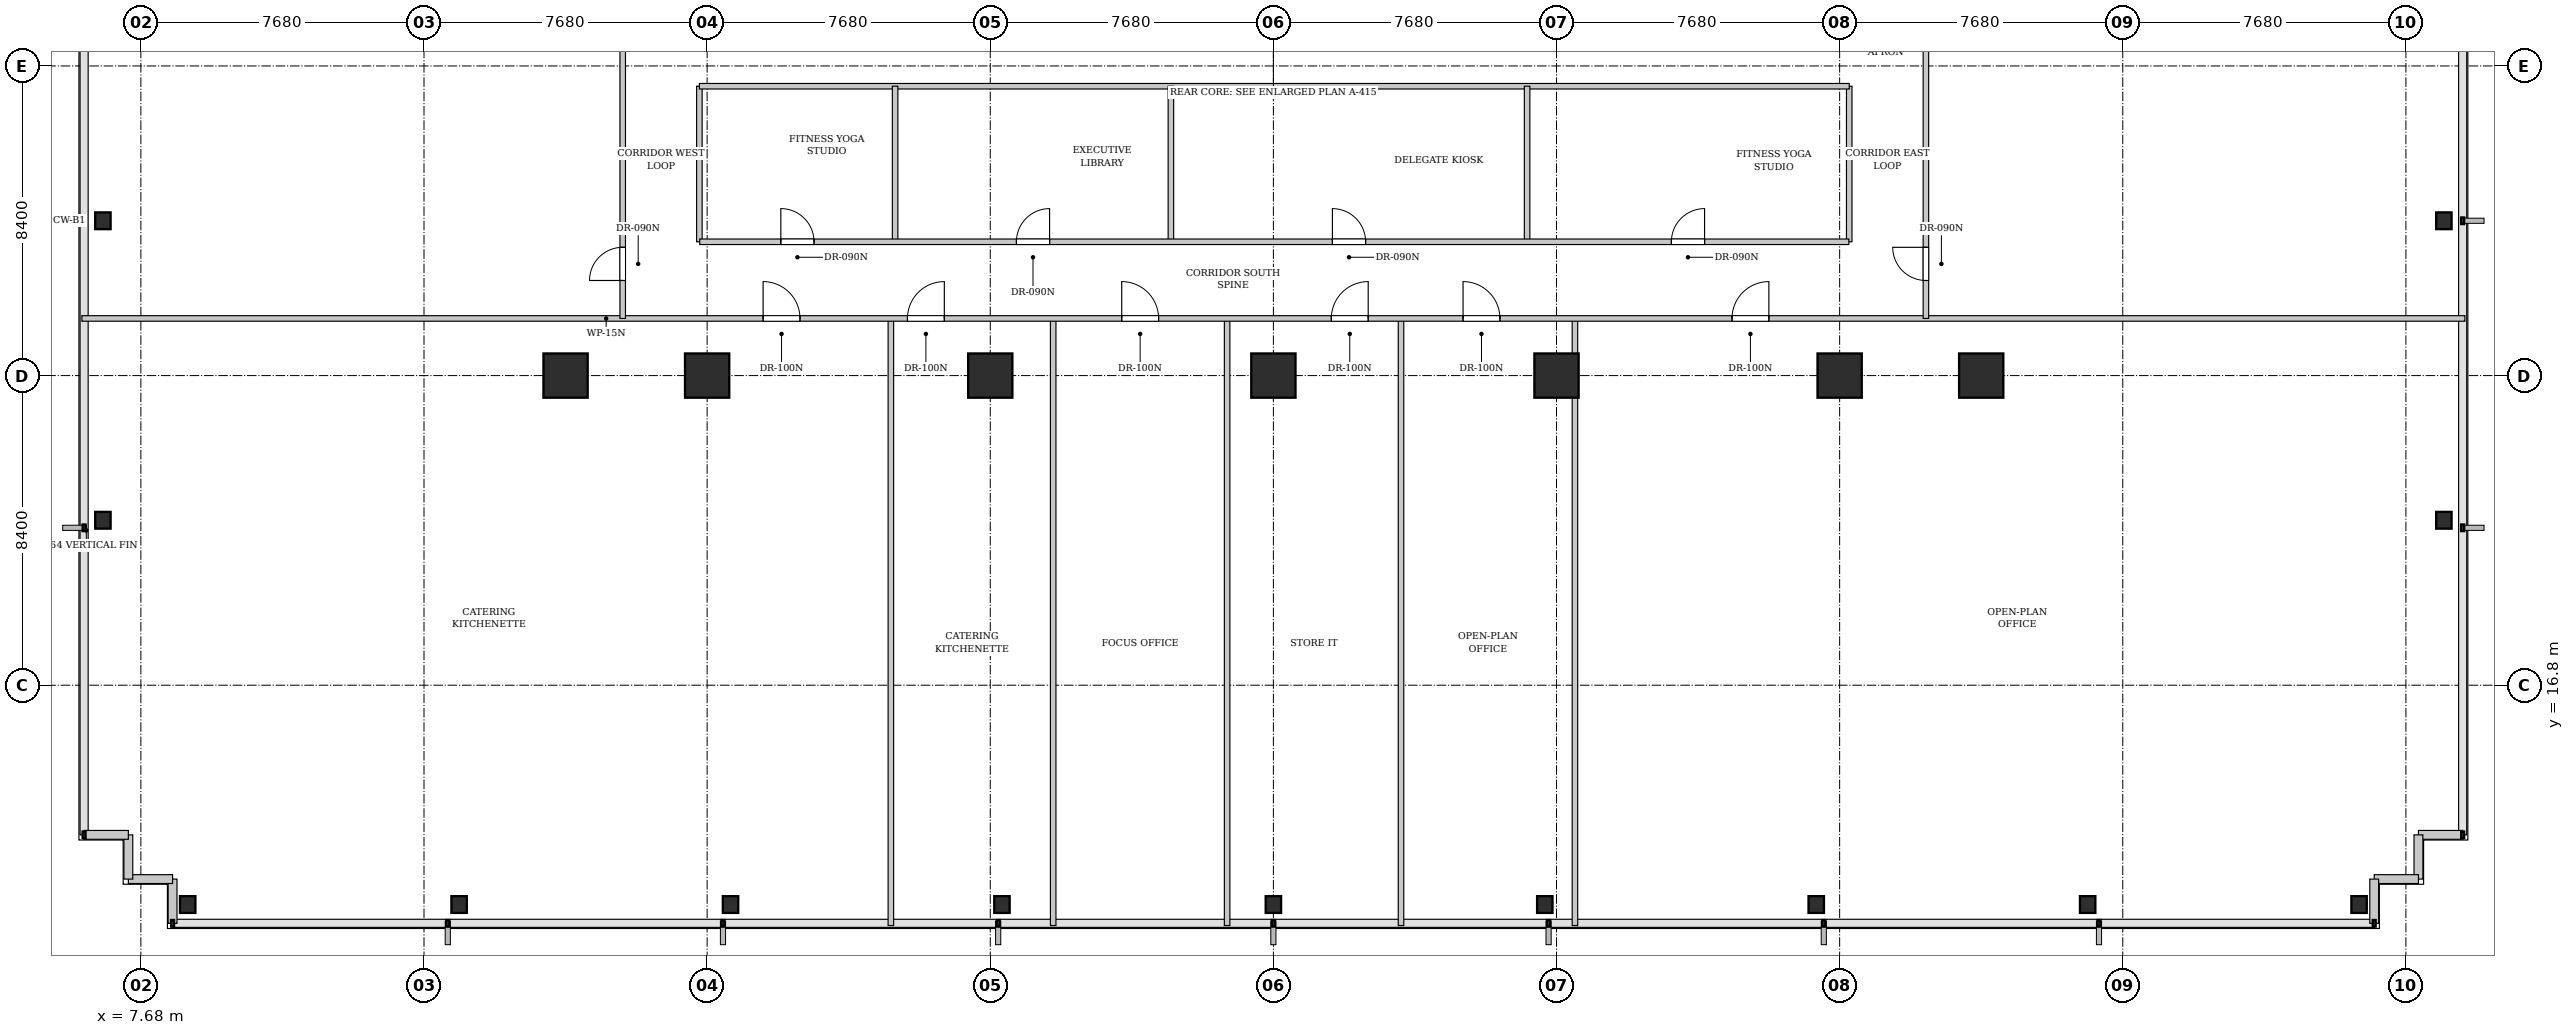
"""IFC4 building model, lengths in metres.
Left out: names, types, materials, properties, quantities, classifications, styles, units other than length and angle.
Written with IfcOpenShell. Run it as: python <this file> out.ifc"""

import sys

from ifc_helpers import new_model, si_unit, direction, frame, frame_2d, origin, origin_2d, place, context, subcontext, project, spatial, rectangle, i_section, extrude, element, fill, save


model = new_model("IFC4")
c1 = context("Model", 3, precision=1e-05, world=origin(), true_north=direction((0.0, 1.0)))
c2 = subcontext(c1, "Body", "Model", "MODEL_VIEW")
j1 = project(units=[si_unit("LENGTHUNIT", "METRE"), si_unit("PLANEANGLEUNIT", "RADIAN")], contexts=[c1])
p1 = place(None, origin())
s1 = spatial("IfcSite", under=j1, at=p1, CompositionType="ELEMENT")
p2 = place(p1, origin())
s2 = spatial("IfcBuilding", under=s1, at=p2, CompositionType="ELEMENT")
p3 = place(p2, frame((0.0, 0.0, 54.2)))
s3 = spatial("IfcBuildingStorey", under=s2, at=p3, CompositionType="ELEMENT", Elevation=54.2)
for number, where, z_axis, x_axis in (
    (1, (23.04, 25.2, 0.0), (0.0, 0.0, 1.0), (1.0, 0.0, 0.0)),
    (2, (30.72, 25.2, 0.0), (0.0, 0.0, 1.0), (1.0, 0.0, 0.0)),
    (3, (38.4, 25.2, 0.0), (0.0, 0.0, 1.0), (1.0, 0.0, 0.0)),
    (4, (46.08, 25.2, 0.0), (0.0, 0.0, 1.0), (1.0, 0.0, 0.0)),
    (5, (53.76, 25.2, 0.0), (0.0, 0.0, 1.0), (1.0, 0.0, 0.0)),
    (6, (19.2, 25.2, 0.0), (0.0, 0.0, 1.0), (1.0, 0.0, 0.0)),
    (7, (57.6, 25.2, 0.0), (0.0, 0.0, 1.0), (1.0, 0.0, 0.0)),
):
    element("IfcColumn", number, at=place(p3, frame(where, z_axis=z_axis, x_axis=x_axis)), inside=s3, PredefinedType="COLUMN", context=c2, shape_type="SweptSolid", body=[
        extrude(rectangle(XDim=1.2, YDim=1.2, at=origin_2d()), origin(), (0.0, 0.0, 1.0), 3.4),
    ])
for number, where, z_axis, x_axis in (
    (8, (8.95, 10.85, 0.0), (0.0, 0.0, 1.0), (1.0, 0.0, 0.0)),
    (9, (16.312, 10.85, 0.0), (0.0, 0.0, 1.0), (1.0, 0.0, 0.0)),
    (10, (23.675, 10.85, 0.0), (0.0, 0.0, 1.0), (1.0, 0.0, 0.0)),
    (11, (31.038, 10.85, 0.0), (0.0, 0.0, 1.0), (1.0, 0.0, 0.0)),
    (12, (38.4, 10.85, 0.0), (0.0, 0.0, 1.0), (1.0, 0.0, 0.0)),
    (13, (45.762, 10.85, 0.0), (0.0, 0.0, 1.0), (1.0, 0.0, 0.0)),
    (14, (53.125, 10.85, 0.0), (0.0, 0.0, 1.0), (1.0, 0.0, 0.0)),
    (15, (60.488, 10.85, 0.0), (0.0, 0.0, 1.0), (1.0, 0.0, 0.0)),
    (16, (67.85, 10.85, 0.0), (0.0, 0.0, 1.0), (1.0, 0.0, 0.0)),
    (17, (6.65, 21.275, 0.0), (0.0, 0.0, 1.0), (1.0, 0.0, 0.0)),
    (18, (70.15, 21.275, 0.0), (0.0, 0.0, 1.0), (1.0, 0.0, 0.0)),
    (19, (6.65, 29.4, 0.0), (0.0, 0.0, 1.0), (1.0, 0.0, 0.0)),
    (20, (70.15, 29.4, 0.0), (0.0, 0.0, 1.0), (1.0, 0.0, 0.0)),
):
    element("IfcColumn", number, at=place(p3, frame(where, z_axis=z_axis, x_axis=x_axis)), inside=s3, PredefinedType="COLUMN", context=c2, shape_type="SweptSolid", body=[
        extrude(i_section(OverallWidth=0.418, OverallDepth=0.455, WebThickness=0.042, FlangeThickness=0.068, FilletRadius=0.015, at=origin_2d()), origin(), (0.0, 0.0, 1.0), 3.4),
    ])
for number, where, z_axis, x_axis in (
    (21, (8.54, 10.34, 0.0), (0.0, 0.0, 1.0), (0.0, 1.0, 0.0)),
    (22, (8.54, 11.54, 0.0), (0.0, 0.0, 1.0), (-1.0, 0.0, 0.0)),
    (23, (7.34, 11.54, 0.0), (0.0, 0.0, 1.0), (0.0, 1.0, 0.0)),
):
    element("IfcWall", number, at=place(p3, frame(where, z_axis=z_axis, x_axis=x_axis)), inside=s3, PredefinedType="SOLIDWALL", context=c2, shape_type="SweptSolid", body=[
        extrude(rectangle(XDim=1.2, YDim=0.24, at=frame_2d((0.6, 0.0))), origin(), (0.0, 0.0, 1.0), 3.18),
    ])
p4 = place(p3, frame((7.34, 12.74, 0.0), z_axis=(0.0, 0.0, 1.0), x_axis=(-1.0, 0.0, 0.0)))
e24 = element("IfcWall", 24, at=p4, inside=s3, PredefinedType="SOLIDWALL", context=c2, shape_type="SweptSolid", body=[
    extrude(rectangle(XDim=1.2, YDim=0.24, at=frame_2d((0.6, 0.0))), origin(), (0.0, 0.0, 1.0), 3.18),
])
for number, where, z_axis, x_axis in (
    (25, (70.66, 12.74, 0.0), (0.0, 0.0, 1.0), (-1.0, 0.0, 0.0)),
    (26, (69.46, 12.74, 0.0), (0.0, 0.0, 1.0), (0.0, -1.0, 0.0)),
    (27, (69.46, 11.54, 0.0), (0.0, 0.0, 1.0), (-1.0, 0.0, 0.0)),
    (28, (68.26, 11.54, 0.0), (0.0, 0.0, 1.0), (0.0, -1.0, 0.0)),
):
    element("IfcWall", number, at=place(p3, frame(where, z_axis=z_axis, x_axis=x_axis)), inside=s3, PredefinedType="SOLIDWALL", context=c2, shape_type="SweptSolid", body=[
        extrude(rectangle(XDim=1.2, YDim=0.24, at=frame_2d((0.6, 0.0))), origin(), (0.0, 0.0, 1.0), 3.18),
    ])
for number, where, z_axis, x_axis in (
    (29, (28.024, 10.28, 0.0), (0.0, 0.0, 1.0), (0.0, 1.0, 0.0)),
    (30, (32.427, 10.28, 0.0), (0.0, 0.0, 1.0), (0.0, 1.0, 0.0)),
    (31, (37.145, 10.28, 0.0), (0.0, 0.0, 1.0), (0.0, 1.0, 0.0)),
    (32, (41.862, 10.28, 0.0), (0.0, 0.0, 1.0), (0.0, 1.0, 0.0)),
    (33, (46.58, 10.28, 0.0), (0.0, 0.0, 1.0), (0.0, 1.0, 0.0)),
):
    element("IfcWall", number, at=place(p3, frame(where, z_axis=z_axis, x_axis=x_axis)), inside=s3, PredefinedType="PARTITIONING", context=c2, shape_type="SweptSolid", body=[
        extrude(rectangle(XDim=16.49, YDim=0.15, at=frame_2d((8.245, 0.0))), origin(), (0.0, 0.0, 1.0), 3.18),
    ])
p5 = place(p3, frame((6.08, 26.75, 0.0), z_axis=(0.0, 0.0, 1.0), x_axis=(1.0, 0.0, 0.0)))
e34 = element("IfcWall", 34, at=p5, inside=s3, PredefinedType="PARTITIONING", context=c2, shape_type="SweptSolid", body=[
    extrude(rectangle(XDim=64.64, YDim=0.15, at=frame_2d((32.32, 0.0))), origin(), (0.0, 0.0, 1.0), 3.18),
])
p6 = place(p5, frame((18.479, 0.0, 0.0)))
e35 = element("IfcOpeningElement", 35, at=p6, cuts=e34, PredefinedType="OPENING", context=c2, shape_type="SweptSolid", body=[
    extrude(rectangle(XDim=1.0, YDim=2.15, at=frame_2d((0.5, 1.075))), frame((0.0, 0.085, 0.0), z_axis=(0.0, -1.0, 0.0), x_axis=(1.0, 0.0, 0.0)), (0.0, 0.0, 1.0), 0.17),
])
p7 = place(p5, frame((22.394, 0.0, 0.0)))
e36 = element("IfcOpeningElement", 36, at=p7, cuts=e34, PredefinedType="OPENING", context=c2, shape_type="SweptSolid", body=[
    extrude(rectangle(XDim=1.0, YDim=2.15, at=frame_2d((0.5, 1.075))), frame((0.0, 0.085, 0.0), z_axis=(0.0, -1.0, 0.0), x_axis=(1.0, 0.0, 0.0)), (0.0, 0.0, 1.0), 0.17),
])
p8 = place(p5, frame((28.206, 0.0, 0.0)))
e37 = element("IfcOpeningElement", 37, at=p8, cuts=e34, PredefinedType="OPENING", context=c2, shape_type="SweptSolid", body=[
    extrude(rectangle(XDim=1.0, YDim=2.15, at=frame_2d((0.5, 1.075))), frame((0.0, 0.085, 0.0), z_axis=(0.0, -1.0, 0.0), x_axis=(1.0, 0.0, 0.0)), (0.0, 0.0, 1.0), 0.17),
])
p9 = place(p5, frame((33.892, 0.0, 0.0)))
e38 = element("IfcOpeningElement", 38, at=p9, cuts=e34, PredefinedType="OPENING", context=c2, shape_type="SweptSolid", body=[
    extrude(rectangle(XDim=1.0, YDim=2.15, at=frame_2d((0.5, 1.075))), frame((0.0, 0.085, 0.0), z_axis=(0.0, -1.0, 0.0), x_axis=(1.0, 0.0, 0.0)), (0.0, 0.0, 1.0), 0.17),
])
p10 = place(p5, frame((37.465, 0.0, 0.0)))
e39 = element("IfcOpeningElement", 39, at=p10, cuts=e34, PredefinedType="OPENING", context=c2, shape_type="SweptSolid", body=[
    extrude(rectangle(XDim=1.0, YDim=2.15, at=frame_2d((0.5, 1.075))), frame((0.0, 0.085, 0.0), z_axis=(0.0, -1.0, 0.0), x_axis=(1.0, 0.0, 0.0)), (0.0, 0.0, 1.0), 0.17),
])
p11 = place(p5, frame((44.76, 0.0, 0.0)))
e40 = element("IfcOpeningElement", 40, at=p11, cuts=e34, PredefinedType="OPENING", context=c2, shape_type="SweptSolid", body=[
    extrude(rectangle(XDim=1.0, YDim=2.15, at=frame_2d((0.5, 1.075))), frame((0.0, 0.085, 0.0), z_axis=(0.0, -1.0, 0.0), x_axis=(1.0, 0.0, 0.0)), (0.0, 0.0, 1.0), 0.17),
])
p12 = place(p3, frame((20.75, 26.75, 0.0), z_axis=(0.0, 0.0, 1.0), x_axis=(0.0, 1.0, 0.0)))
e41 = element("IfcWall", 41, at=p12, inside=s3, PredefinedType="PARTITIONING", context=c2, shape_type="SweptSolid", body=[
    extrude(rectangle(XDim=21.77, YDim=0.15, at=frame_2d((10.885, 0.0))), origin(), (0.0, 0.0, 1.0), 3.18),
])
p13 = place(p12, frame((1.03, 0.0, 0.0)))
e42 = element("IfcOpeningElement", 42, at=p13, cuts=e41, PredefinedType="OPENING", context=c2, shape_type="SweptSolid", body=[
    extrude(rectangle(XDim=0.9, YDim=2.15, at=frame_2d((0.45, 1.075))), frame((0.0, 0.085, 0.0), z_axis=(0.0, -1.0, 0.0), x_axis=(1.0, 0.0, 0.0)), (0.0, 0.0, 1.0), 0.17),
])
p14 = place(p3, frame((56.1, 26.75, 0.0), z_axis=(0.0, 0.0, 1.0), x_axis=(0.0, 1.0, 0.0)))
e43 = element("IfcWall", 43, at=p14, inside=s3, PredefinedType="PARTITIONING", context=c2, shape_type="SweptSolid", body=[
    extrude(rectangle(XDim=21.77, YDim=0.15, at=frame_2d((10.885, 0.0))), origin(), (0.0, 0.0, 1.0), 3.18),
])
p15 = place(p14, frame((1.03, 0.0, 0.0)))
e44 = element("IfcOpeningElement", 44, at=p15, cuts=e43, PredefinedType="OPENING", context=c2, shape_type="SweptSolid", body=[
    extrude(rectangle(XDim=0.9, YDim=2.15, at=frame_2d((0.45, 1.075))), frame((0.0, 0.085, 0.0), z_axis=(0.0, -1.0, 0.0), x_axis=(1.0, 0.0, 0.0)), (0.0, 0.0, 1.0), 0.17),
])
p16 = place(p3, frame((22.83, 28.83, 0.0), z_axis=(0.0, 0.0, 1.0), x_axis=(0.0, 1.0, 0.0)))
e45 = element("IfcWall", 45, at=p16, inside=s3, PredefinedType="PARTITIONING", context=c2, shape_type="SweptSolid", body=[
    extrude(rectangle(XDim=4.22, YDim=0.15, at=frame_2d((2.11, 0.0))), origin(), (0.0, 0.0, 1.0), 2.475),
])
p17 = place(p3, frame((54.02, 28.83, 0.0), z_axis=(0.0, 0.0, 1.0), x_axis=(0.0, 1.0, 0.0)))
e46 = element("IfcWall", 46, at=p17, inside=s3, PredefinedType="PARTITIONING", context=c2, shape_type="SweptSolid", body=[
    extrude(rectangle(XDim=4.22, YDim=0.15, at=frame_2d((2.11, 0.0))), origin(), (0.0, 0.0, 1.0), 3.18),
])
p18 = place(p3, frame((22.83, 33.05, 0.0), z_axis=(0.0, 0.0, 1.0), x_axis=(1.0, 0.0, 0.0)))
e47 = element("IfcWall", 47, at=p18, inside=s3, PredefinedType="PARTITIONING", context=c2, shape_type="SweptSolid", body=[
    extrude(rectangle(XDim=31.19, YDim=0.15, at=frame_2d((15.595, 0.0))), origin(), (0.0, 0.0, 1.0), 3.18),
])
for number, where, z_axis, x_axis in (
    (48, (28.139, 28.83, 0.0), (0.0, 0.0, 1.0), (0.0, 1.0, 0.0)),
    (49, (35.62, 28.83, 0.0), (0.0, 0.0, 1.0), (0.0, 1.0, 0.0)),
    (50, (45.282, 28.83, 0.0), (0.0, 0.0, 1.0), (0.0, 1.0, 0.0)),
):
    element("IfcWall", number, at=place(p3, frame(where, z_axis=z_axis, x_axis=x_axis)), inside=s3, PredefinedType="PARTITIONING", context=c2, shape_type="SweptSolid", body=[
        extrude(rectangle(XDim=4.22, YDim=0.15, at=frame_2d((2.11, 0.0))), origin(), (0.0, 0.0, 1.0), 3.18),
    ])
p19 = place(p3, frame((22.84, 28.83, 0.0), z_axis=(0.0, 0.0, 1.0), x_axis=(1.0, 0.0, 0.0)))
e51 = element("IfcWall", 51, at=p19, inside=s3, PredefinedType="PARTITIONING", context=c2, shape_type="SweptSolid", body=[
    extrude(rectangle(XDim=31.17, YDim=0.15, at=frame_2d((15.585, 0.0))), origin(), (0.0, 0.0, 1.0), 3.18),
])
p20 = place(p19, frame((2.199, 0.0, 0.0)))
e52 = element("IfcOpeningElement", 52, at=p20, cuts=e51, PredefinedType="OPENING", context=c2, shape_type="SweptSolid", body=[
    extrude(rectangle(XDim=0.9, YDim=2.15, at=frame_2d((0.45, 1.075))), frame((0.0, 0.085, 0.0), z_axis=(0.0, -1.0, 0.0), x_axis=(1.0, 0.0, 0.0)), (0.0, 0.0, 1.0), 0.17),
])
p21 = place(p19, frame((8.59, 0.0, 0.0)))
e53 = element("IfcOpeningElement", 53, at=p21, cuts=e51, PredefinedType="OPENING", context=c2, shape_type="SweptSolid", body=[
    extrude(rectangle(XDim=0.9, YDim=2.15, at=frame_2d((0.45, 1.075))), frame((0.0, 0.085, 0.0), z_axis=(0.0, -1.0, 0.0), x_axis=(1.0, 0.0, 0.0)), (0.0, 0.0, 1.0), 0.17),
])
p22 = place(p19, frame((17.161, 0.0, 0.0)))
e54 = element("IfcOpeningElement", 54, at=p22, cuts=e51, PredefinedType="OPENING", context=c2, shape_type="SweptSolid", body=[
    extrude(rectangle(XDim=0.9, YDim=2.15, at=frame_2d((0.45, 1.075))), frame((0.0, 0.085, 0.0), z_axis=(0.0, -1.0, 0.0), x_axis=(1.0, 0.0, 0.0)), (0.0, 0.0, 1.0), 0.17),
])
p23 = place(p19, frame((26.356, 0.0, 0.0)))
e55 = element("IfcOpeningElement", 55, at=p23, cuts=e51, PredefinedType="OPENING", context=c2, shape_type="SweptSolid", body=[
    extrude(rectangle(XDim=0.9, YDim=2.15, at=frame_2d((0.45, 1.075))), frame((0.0, 0.085, 0.0), z_axis=(0.0, -1.0, 0.0), x_axis=(1.0, 0.0, 0.0)), (0.0, 0.0, 1.0), 0.17),
])
p24 = place(p6, origin())
e56 = element("IfcDoor", 56, at=p24, inside=s3, OperationType="SINGLE_SWING_LEFT", PredefinedType="DOOR", context=c2, shape_type="SweptSolid", body=[
    extrude(rectangle(XDim=1.0, YDim=2.15, at=frame_2d((0.5, 1.075))), frame((0.0, 0.025, 0.0), z_axis=(0.0, -1.0, 0.0), x_axis=(1.0, 0.0, 0.0)), (0.0, 0.0, 1.0), 0.05),
])
fill(e35, e56)
p25 = place(p7, origin())
e57 = element("IfcDoor", 57, at=p25, inside=s3, OperationType="SINGLE_SWING_RIGHT", PredefinedType="DOOR", context=c2, shape_type="SweptSolid", body=[
    extrude(rectangle(XDim=1.0, YDim=2.15, at=frame_2d((0.5, 1.075))), frame((0.0, 0.025, 0.0), z_axis=(0.0, -1.0, 0.0), x_axis=(1.0, 0.0, 0.0)), (0.0, 0.0, 1.0), 0.05),
])
fill(e36, e57)
p26 = place(p8, origin())
e58 = element("IfcDoor", 58, at=p26, inside=s3, OperationType="SINGLE_SWING_LEFT", PredefinedType="DOOR", context=c2, shape_type="SweptSolid", body=[
    extrude(rectangle(XDim=1.0, YDim=2.15, at=frame_2d((0.5, 1.075))), frame((0.0, 0.025, 0.0), z_axis=(0.0, -1.0, 0.0), x_axis=(1.0, 0.0, 0.0)), (0.0, 0.0, 1.0), 0.05),
])
fill(e37, e58)
p27 = place(p9, origin())
e59 = element("IfcDoor", 59, at=p27, inside=s3, OperationType="SINGLE_SWING_RIGHT", PredefinedType="DOOR", context=c2, shape_type="SweptSolid", body=[
    extrude(rectangle(XDim=1.0, YDim=2.15, at=frame_2d((0.5, 1.075))), frame((0.0, 0.025, 0.0), z_axis=(0.0, -1.0, 0.0), x_axis=(1.0, 0.0, 0.0)), (0.0, 0.0, 1.0), 0.05),
])
fill(e38, e59)
p28 = place(p10, origin())
e60 = element("IfcDoor", 60, at=p28, inside=s3, OperationType="SINGLE_SWING_LEFT", PredefinedType="DOOR", context=c2, shape_type="SweptSolid", body=[
    extrude(rectangle(XDim=1.0, YDim=2.15, at=frame_2d((0.5, 1.075))), frame((0.0, 0.025, 0.0), z_axis=(0.0, -1.0, 0.0), x_axis=(1.0, 0.0, 0.0)), (0.0, 0.0, 1.0), 0.05),
])
fill(e39, e60)
p29 = place(p11, origin())
e61 = element("IfcDoor", 61, at=p29, inside=s3, OperationType="SINGLE_SWING_RIGHT", PredefinedType="DOOR", context=c2, shape_type="SweptSolid", body=[
    extrude(rectangle(XDim=1.0, YDim=2.15, at=frame_2d((0.5, 1.075))), frame((0.0, 0.025, 0.0), z_axis=(0.0, -1.0, 0.0), x_axis=(1.0, 0.0, 0.0)), (0.0, 0.0, 1.0), 0.05),
])
fill(e40, e61)
p30 = place(p13, origin())
e62 = element("IfcDoor", 62, at=p30, inside=s3, OperationType="SINGLE_SWING_LEFT", PredefinedType="DOOR", context=c2, shape_type="SweptSolid", body=[
    extrude(rectangle(XDim=0.9, YDim=2.15, at=frame_2d((0.45, 1.075))), frame((0.0, 0.025, 0.0), z_axis=(0.0, -1.0, 0.0), x_axis=(1.0, 0.0, 0.0)), (0.0, 0.0, 1.0), 0.05),
])
fill(e42, e62)
p31 = place(p15, origin())
e63 = element("IfcDoor", 63, at=p31, inside=s3, OperationType="SINGLE_SWING_RIGHT", PredefinedType="DOOR", context=c2, shape_type="SweptSolid", body=[
    extrude(rectangle(XDim=0.9, YDim=2.15, at=frame_2d((0.45, 1.075))), frame((0.0, 0.025, 0.0), z_axis=(0.0, -1.0, 0.0), x_axis=(1.0, 0.0, 0.0)), (0.0, 0.0, 1.0), 0.05),
])
fill(e44, e63)
p32 = place(p20, origin())
e64 = element("IfcDoor", 64, at=p32, inside=s3, OperationType="SINGLE_SWING_LEFT", PredefinedType="DOOR", context=c2, shape_type="SweptSolid", body=[
    extrude(rectangle(XDim=0.9, YDim=2.15, at=frame_2d((0.45, 1.075))), frame((0.0, 0.025, 0.0), z_axis=(0.0, -1.0, 0.0), x_axis=(1.0, 0.0, 0.0)), (0.0, 0.0, 1.0), 0.05),
])
fill(e52, e64)
p33 = place(p21, origin())
e65 = element("IfcDoor", 65, at=p33, inside=s3, OperationType="SINGLE_SWING_RIGHT", PredefinedType="DOOR", context=c2, shape_type="SweptSolid", body=[
    extrude(rectangle(XDim=0.9, YDim=2.15, at=frame_2d((0.45, 1.075))), frame((0.0, 0.025, 0.0), z_axis=(0.0, -1.0, 0.0), x_axis=(1.0, 0.0, 0.0)), (0.0, 0.0, 1.0), 0.05),
])
fill(e53, e65)
p34 = place(p22, origin())
e66 = element("IfcDoor", 66, at=p34, inside=s3, OperationType="SINGLE_SWING_LEFT", PredefinedType="DOOR", context=c2, shape_type="SweptSolid", body=[
    extrude(rectangle(XDim=0.9, YDim=2.15, at=frame_2d((0.45, 1.075))), frame((0.0, 0.025, 0.0), z_axis=(0.0, -1.0, 0.0), x_axis=(1.0, 0.0, 0.0)), (0.0, 0.0, 1.0), 0.05),
])
fill(e54, e66)
p35 = place(p23, origin())
e67 = element("IfcDoor", 67, at=p35, inside=s3, OperationType="SINGLE_SWING_RIGHT", PredefinedType="DOOR", context=c2, shape_type="SweptSolid", body=[
    extrude(rectangle(XDim=0.9, YDim=2.15, at=frame_2d((0.45, 1.075))), frame((0.0, 0.025, 0.0), z_axis=(0.0, -1.0, 0.0), x_axis=(1.0, 0.0, 0.0)), (0.0, 0.0, 1.0), 0.05),
])
fill(e55, e67)
save(model, sys.argv[1])
